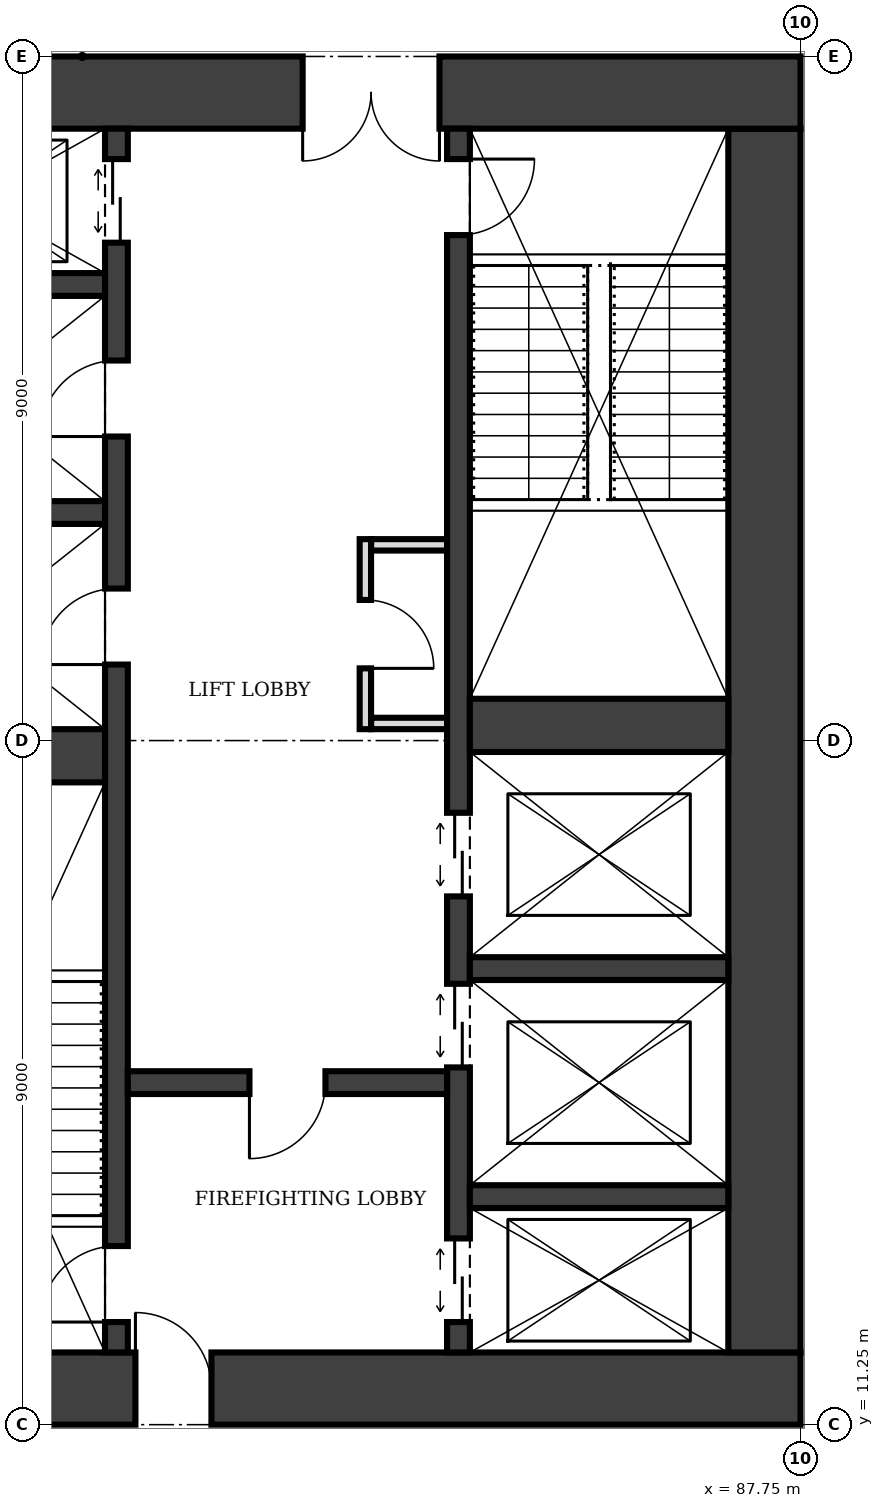
"""IFC4 building model, lengths in metres.
Left out: names, types, materials, properties, quantities, classifications, styles, units other than length and angle.
Written with IfcOpenShell. Run it as: python <this file> out.ifc"""

import sys

from ifc_helpers import new_model, si_unit, direction, frame, frame_2d, origin, place, context, subcontext, project, spatial, rectangle, extrude, element, fill, save


model = new_model("IFC4")
c1 = context("Model", 3, precision=1e-05, world=origin(), true_north=direction((0.0, 1.0)))
c2 = subcontext(c1, "Body", "Model", "MODEL_VIEW")
j1 = project(units=[si_unit("LENGTHUNIT", "METRE"), si_unit("PLANEANGLEUNIT", "RADIAN")], contexts=[c1])
p1 = place(None, origin())
s1 = spatial("IfcSite", under=j1, at=p1, CompositionType="ELEMENT")
p2 = place(p1, origin())
s2 = spatial("IfcBuilding", under=s1, at=p2, CompositionType="ELEMENT")
p3 = place(p2, frame((0.0, 0.0, 149.0)))
s3 = spatial("IfcBuildingStorey", under=s2, at=p3, CompositionType="ELEMENT", Elevation=149.0)
p4 = place(p3, frame((74.25, 11.725, 0.0), z_axis=(0.0, 0.0, 1.0), x_axis=(1.0, 0.0, 0.0)))
e1 = element("IfcWall", 1, at=p4, inside=s3, PredefinedType="SHEAR", context=c2, shape_type="SweptSolid", body=[
    extrude(rectangle(XDim=13.5, YDim=0.95, at=frame_2d((6.75, 0.0))), origin(), (0.0, 0.0, 1.0), 4.0),
])
p5 = place(p4, frame((4.75, 0.0, 0.0)))
e2 = element("IfcOpeningElement", 2, at=p5, cuts=e1, PredefinedType="OPENING", context=c2, shape_type="SweptSolid", body=[
    extrude(rectangle(XDim=1.0, YDim=2.1, at=frame_2d((0.5, 1.05))), frame((0.0, 0.485, 0.0), z_axis=(0.0, -1.0, 0.0), x_axis=(1.0, 0.0, 0.0)), (0.0, 0.0, 1.0), 0.97),
])
p6 = place(p3, frame((87.275, 12.2, 0.0), z_axis=(0.0, 0.0, 1.0), x_axis=(0.0, 1.0, 0.0)))
e3 = element("IfcWall", 3, at=p6, inside=s3, PredefinedType="SHEAR", context=c2, shape_type="SweptSolid", body=[
    extrude(rectangle(XDim=16.1, YDim=0.95, at=frame_2d((8.05, 0.0))), origin(), (0.0, 0.0, 1.0), 4.0),
])
p7 = place(p3, frame((87.75, 28.775, 0.0), z_axis=(0.0, 0.0, 1.0), x_axis=(-1.0, 0.0, 0.0)))
e4 = element("IfcWall", 4, at=p7, inside=s3, PredefinedType="SHEAR", context=c2, shape_type="SweptSolid", body=[
    extrude(rectangle(XDim=13.5, YDim=0.95, at=frame_2d((6.75, 0.0))), origin(), (0.0, 0.0, 1.0), 4.0),
])
p8 = place(p7, frame((4.75, 0.0, 0.0)))
e5 = element("IfcOpeningElement", 5, at=p8, cuts=e4, PredefinedType="OPENING", context=c2, shape_type="SweptSolid", body=[
    extrude(rectangle(XDim=1.8, YDim=2.1, at=frame_2d((0.9, 1.05))), frame((0.0, 0.485, 0.0), z_axis=(0.0, -1.0, 0.0), x_axis=(1.0, 0.0, 0.0)), (0.0, 0.0, 1.0), 0.97),
])
p9 = place(p3, frame((78.75, 12.2, 0.0), z_axis=(0.0, 0.0, 1.0), x_axis=(0.0, 1.0, 0.0)))
e6 = element("IfcWall", 6, at=p9, inside=s3, PredefinedType="SHEAR", context=c2, shape_type="SweptSolid", body=[
    extrude(rectangle(XDim=16.1, YDim=0.3, at=frame_2d((8.05, 0.0))), origin(), (0.0, 0.0, 1.0), 4.0),
])
p10 = place(p9, frame((0.4, 0.0, 0.0)))
e7 = element("IfcOpeningElement", 7, at=p10, cuts=e6, PredefinedType="OPENING", context=c2, shape_type="SweptSolid", body=[
    extrude(rectangle(XDim=1.0, YDim=2.1, at=frame_2d((0.5, 1.05))), frame((0.0, 0.16, 0.0), z_axis=(0.0, -1.0, 0.0), x_axis=(1.0, 0.0, 0.0)), (0.0, 0.0, 1.0), 0.32),
])
p11 = place(p9, frame((14.6, 0.0, 0.0)))
e8 = element("IfcOpeningElement", 8, at=p11, cuts=e6, PredefinedType="OPENING", context=c2, shape_type="SweptSolid", body=[
    extrude(rectangle(XDim=1.1, YDim=2.1, at=frame_2d((0.55, 1.05))), frame((0.0, 0.16, 0.0), z_axis=(0.0, -1.0, 0.0), x_axis=(1.0, 0.0, 0.0)), (0.0, 0.0, 1.0), 0.32),
])
p12 = place(p9, frame((9.05, 0.0, 0.0)))
e9 = element("IfcOpeningElement", 9, at=p12, cuts=e6, PredefinedType="OPENING", context=c2, shape_type="SweptSolid", body=[
    extrude(rectangle(XDim=1.0, YDim=2.1, at=frame_2d((0.5, 1.05))), frame((0.0, 0.16, 0.0), z_axis=(0.0, -1.0, 0.0), x_axis=(1.0, 0.0, 0.0)), (0.0, 0.0, 1.0), 0.32),
])
p13 = place(p9, frame((12.05, 0.0, 0.0)))
e10 = element("IfcOpeningElement", 10, at=p13, cuts=e6, PredefinedType="OPENING", context=c2, shape_type="SweptSolid", body=[
    extrude(rectangle(XDim=1.0, YDim=2.1, at=frame_2d((0.5, 1.05))), frame((0.0, 0.16, 0.0), z_axis=(0.0, -1.0, 0.0), x_axis=(1.0, 0.0, 0.0)), (0.0, 0.0, 1.0), 0.32),
])
p14 = place(p3, frame((83.25, 12.2, 0.0), z_axis=(0.0, 0.0, 1.0), x_axis=(0.0, 1.0, 0.0)))
e11 = element("IfcWall", 11, at=p14, inside=s3, PredefinedType="SHEAR", context=c2, shape_type="SweptSolid", body=[
    extrude(rectangle(XDim=16.1, YDim=0.3, at=frame_2d((8.05, 0.0))), origin(), (0.0, 0.0, 1.0), 4.0),
])
p15 = place(p14, frame((14.7, 0.0, 0.0)))
e12 = element("IfcOpeningElement", 12, at=p15, cuts=e11, PredefinedType="OPENING", context=c2, shape_type="SweptSolid", body=[
    extrude(rectangle(XDim=1.0, YDim=2.1, at=frame_2d((0.5, 1.05))), frame((0.0, 0.16, 0.0), z_axis=(0.0, -1.0, 0.0), x_axis=(1.0, 0.0, 0.0)), (0.0, 0.0, 1.0), 0.32),
])
p16 = place(p14, frame((0.4, 0.0, 0.0)))
e13 = element("IfcOpeningElement", 13, at=p16, cuts=e11, PredefinedType="OPENING", context=c2, shape_type="SweptSolid", body=[
    extrude(rectangle(XDim=1.1, YDim=2.1, at=frame_2d((0.55, 1.05))), frame((0.0, 0.16, 0.0), z_axis=(0.0, -1.0, 0.0), x_axis=(1.0, 0.0, 0.0)), (0.0, 0.0, 1.0), 0.32),
])
p17 = place(p14, frame((3.75, 0.0, 0.0)))
e14 = element("IfcOpeningElement", 14, at=p17, cuts=e11, PredefinedType="OPENING", context=c2, shape_type="SweptSolid", body=[
    extrude(rectangle(XDim=1.1, YDim=2.1, at=frame_2d((0.55, 1.05))), frame((0.0, 0.16, 0.0), z_axis=(0.0, -1.0, 0.0), x_axis=(1.0, 0.0, 0.0)), (0.0, 0.0, 1.0), 0.32),
])
p18 = place(p14, frame((6.0, 0.0, 0.0)))
e15 = element("IfcOpeningElement", 15, at=p18, cuts=e11, PredefinedType="OPENING", context=c2, shape_type="SweptSolid", body=[
    extrude(rectangle(XDim=1.1, YDim=2.1, at=frame_2d((0.55, 1.05))), frame((0.0, 0.16, 0.0), z_axis=(0.0, -1.0, 0.0), x_axis=(1.0, 0.0, 0.0)), (0.0, 0.0, 1.0), 0.32),
])
p19 = place(p3, frame((75.2, 20.05, 0.0), z_axis=(0.0, 0.0, 1.0), x_axis=(1.0, 0.0, 0.0)))
e16 = element("IfcWall", 16, at=p19, inside=s3, PredefinedType="SHEAR", context=c2, shape_type="SweptSolid", body=[
    extrude(rectangle(XDim=3.4, YDim=0.7, at=frame_2d((1.7, 0.0))), origin(), (0.0, 0.0, 1.0), 4.0),
])
p20 = place(p3, frame((78.9, 15.75, 0.0), z_axis=(0.0, 0.0, 1.0), x_axis=(1.0, 0.0, 0.0)))
e17 = element("IfcWall", 17, at=p20, inside=s3, PredefinedType="SHEAR", context=c2, shape_type="SweptSolid", body=[
    extrude(rectangle(XDim=4.2, YDim=0.3, at=frame_2d((2.1, 0.0))), origin(), (0.0, 0.0, 1.0), 4.0),
])
p21 = place(p20, frame((1.6, 0.0, 0.0)))
e18 = element("IfcOpeningElement", 18, at=p21, cuts=e17, PredefinedType="OPENING", context=c2, shape_type="SweptSolid", body=[
    extrude(rectangle(XDim=1.0, YDim=2.1, at=frame_2d((0.5, 1.05))), frame((0.0, 0.16, 0.0), z_axis=(0.0, -1.0, 0.0), x_axis=(1.0, 0.0, 0.0)), (0.0, 0.0, 1.0), 0.32),
])
for number, where, z_axis, x_axis in (
    (19, (83.4, 14.25, 0.0), (0.0, 0.0, 1.0), (1.0, 0.0, 0.0)),
    (20, (83.4, 17.25, 0.0), (0.0, 0.0, 1.0), (1.0, 0.0, 0.0)),
):
    element("IfcWall", number, at=place(p3, frame(where, z_axis=z_axis, x_axis=x_axis)), inside=s3, PredefinedType="SHEAR", context=c2, shape_type="SweptSolid", body=[
        extrude(rectangle(XDim=3.4, YDim=0.3, at=frame_2d((1.7, 0.0))), origin(), (0.0, 0.0, 1.0), 4.0),
    ])
p22 = place(p3, frame((83.4, 20.45, 0.0), z_axis=(0.0, 0.0, 1.0), x_axis=(1.0, 0.0, 0.0)))
e21 = element("IfcWall", 21, at=p22, inside=s3, PredefinedType="SHEAR", context=c2, shape_type="SweptSolid", body=[
    extrude(rectangle(XDim=3.4, YDim=0.7, at=frame_2d((1.7, 0.0))), origin(), (0.0, 0.0, 1.0), 4.0),
])
for number, where, z_axis, x_axis in (
    (22, (75.2, 23.25, 0.0), (0.0, 0.0, 1.0), (1.0, 0.0, 0.0)),
    (23, (75.2, 26.25, 0.0), (0.0, 0.0, 1.0), (1.0, 0.0, 0.0)),
):
    element("IfcWall", number, at=place(p3, frame(where, z_axis=z_axis, x_axis=x_axis)), inside=s3, PredefinedType="SHEAR", context=c2, shape_type="SweptSolid", body=[
        extrude(rectangle(XDim=3.4, YDim=0.3, at=frame_2d((1.7, 0.0))), origin(), (0.0, 0.0, 1.0), 4.0),
    ])
p23 = place(p3, frame((82.025, 20.4, 0.0), z_axis=(0.0, 0.0, 1.0), x_axis=(0.0, 1.0, 0.0)))
e24 = element("IfcWall", 24, at=p23, inside=s3, PredefinedType="PARTITIONING", context=c2, shape_type="SweptSolid", body=[
    extrude(rectangle(XDim=2.5, YDim=0.15, at=frame_2d((1.25, 0.0))), origin(), (0.0, 0.0, 1.0), 3.75),
])
p24 = place(p23, frame((0.8, 0.0, 0.0)))
e25 = element("IfcOpeningElement", 25, at=p24, cuts=e24, PredefinedType="OPENING", context=c2, shape_type="SweptSolid", body=[
    extrude(rectangle(XDim=0.9, YDim=2.1, at=frame_2d((0.45, 1.05))), frame((0.0, 0.085, 0.0), z_axis=(0.0, -1.0, 0.0), x_axis=(1.0, 0.0, 0.0)), (0.0, 0.0, 1.0), 0.17),
])
for number, where, z_axis, x_axis in (
    (26, (82.1, 20.475, 0.0), (0.0, 0.0, 1.0), (1.0, 0.0, 0.0)),
    (27, (82.1, 22.825, 0.0), (0.0, 0.0, 1.0), (1.0, 0.0, 0.0)),
):
    element("IfcWall", number, at=place(p3, frame(where, z_axis=z_axis, x_axis=x_axis)), inside=s3, PredefinedType="PARTITIONING", context=c2, shape_type="SweptSolid", body=[
        extrude(rectangle(XDim=1.0, YDim=0.15, at=frame_2d((0.5, 0.0))), origin(), (0.0, 0.0, 1.0), 3.75),
    ])
p25 = place(p5, origin())
e28 = element("IfcDoor", 28, at=p25, inside=s3, OperationType="SINGLE_SWING_LEFT", PredefinedType="DOOR", context=c2, shape_type="SweptSolid", body=[
    extrude(rectangle(XDim=1.0, YDim=2.1, at=frame_2d((0.5, 1.05))), frame((0.0, 0.025, 0.0), z_axis=(0.0, -1.0, 0.0), x_axis=(1.0, 0.0, 0.0)), (0.0, 0.0, 1.0), 0.05),
])
fill(e2, e28)
p26 = place(p8, origin())
e29 = element("IfcDoor", 29, at=p26, inside=s3, OperationType="DOUBLE_DOOR_SINGLE_SWING", PredefinedType="DOOR", context=c2, shape_type="SweptSolid", body=[
    extrude(rectangle(XDim=1.8, YDim=2.1, at=frame_2d((0.9, 1.05))), frame((0.0, 0.025, 0.0), z_axis=(0.0, -1.0, 0.0), x_axis=(1.0, 0.0, 0.0)), (0.0, 0.0, 1.0), 0.05),
])
fill(e5, e29)
p27 = place(p21, frame((1.0, 0.0, 0.0), z_axis=(0.0, 0.0, 1.0), x_axis=(-1.0, 0.0, 0.0)))
e30 = element("IfcDoor", 30, at=p27, inside=s3, OperationType="SINGLE_SWING_RIGHT", PredefinedType="DOOR", context=c2, shape_type="SweptSolid", body=[
    extrude(rectangle(XDim=1.0, YDim=2.1, at=frame_2d((0.5, 1.05))), frame((0.0, 0.025, 0.0), z_axis=(0.0, -1.0, 0.0), x_axis=(1.0, 0.0, 0.0)), (0.0, 0.0, 1.0), 0.05),
])
fill(e18, e30)
p28 = place(p10, origin())
e31 = element("IfcDoor", 31, at=p28, inside=s3, OperationType="SINGLE_SWING_LEFT", PredefinedType="DOOR", context=c2, shape_type="SweptSolid", body=[
    extrude(rectangle(XDim=1.0, YDim=2.1, at=frame_2d((0.5, 1.05))), frame((0.0, 0.025, 0.0), z_axis=(0.0, -1.0, 0.0), x_axis=(1.0, 0.0, 0.0)), (0.0, 0.0, 1.0), 0.05),
])
fill(e7, e31)
p29 = place(p15, frame((1.0, 0.0, 0.0), z_axis=(0.0, 0.0, 1.0), x_axis=(-1.0, 0.0, 0.0)))
e32 = element("IfcDoor", 32, at=p29, inside=s3, OperationType="SINGLE_SWING_LEFT", PredefinedType="DOOR", context=c2, shape_type="SweptSolid", body=[
    extrude(rectangle(XDim=1.0, YDim=2.1, at=frame_2d((0.5, 1.05))), frame((0.0, 0.025, 0.0), z_axis=(0.0, -1.0, 0.0), x_axis=(1.0, 0.0, 0.0)), (0.0, 0.0, 1.0), 0.05),
])
fill(e12, e32)
p30 = place(p16, origin())
e33 = element("IfcDoor", 33, at=p30, inside=s3, OperationType="DOUBLE_DOOR_SLIDING", PredefinedType="DOOR", context=c2, shape_type="SweptSolid", body=[
    extrude(rectangle(XDim=1.1, YDim=2.1, at=frame_2d((0.55, 1.05))), frame((0.0, 0.025, 0.0), z_axis=(0.0, -1.0, 0.0), x_axis=(1.0, 0.0, 0.0)), (0.0, 0.0, 1.0), 0.05),
])
fill(e13, e33)
p31 = place(p11, origin())
e34 = element("IfcDoor", 34, at=p31, inside=s3, OperationType="DOUBLE_DOOR_SLIDING", PredefinedType="DOOR", context=c2, shape_type="SweptSolid", body=[
    extrude(rectangle(XDim=1.1, YDim=2.1, at=frame_2d((0.55, 1.05))), frame((0.0, 0.025, 0.0), z_axis=(0.0, -1.0, 0.0), x_axis=(1.0, 0.0, 0.0)), (0.0, 0.0, 1.0), 0.05),
])
fill(e8, e34)
p32 = place(p17, origin())
e35 = element("IfcDoor", 35, at=p32, inside=s3, OperationType="DOUBLE_DOOR_SLIDING", PredefinedType="DOOR", context=c2, shape_type="SweptSolid", body=[
    extrude(rectangle(XDim=1.1, YDim=2.1, at=frame_2d((0.55, 1.05))), frame((0.0, 0.025, 0.0), z_axis=(0.0, -1.0, 0.0), x_axis=(1.0, 0.0, 0.0)), (0.0, 0.0, 1.0), 0.05),
])
fill(e14, e35)
p33 = place(p18, origin())
e36 = element("IfcDoor", 36, at=p33, inside=s3, OperationType="DOUBLE_DOOR_SLIDING", PredefinedType="DOOR", context=c2, shape_type="SweptSolid", body=[
    extrude(rectangle(XDim=1.1, YDim=2.1, at=frame_2d((0.55, 1.05))), frame((0.0, 0.025, 0.0), z_axis=(0.0, -1.0, 0.0), x_axis=(1.0, 0.0, 0.0)), (0.0, 0.0, 1.0), 0.05),
])
fill(e15, e36)
p34 = place(p24, frame((0.9, 0.0, 0.0), z_axis=(0.0, 0.0, 1.0), x_axis=(-1.0, 0.0, 0.0)))
e37 = element("IfcDoor", 37, at=p34, inside=s3, OperationType="SINGLE_SWING_RIGHT", PredefinedType="DOOR", context=c2, shape_type="SweptSolid", body=[
    extrude(rectangle(XDim=0.9, YDim=2.1, at=frame_2d((0.45, 1.05))), frame((0.0, 0.025, 0.0), z_axis=(0.0, -1.0, 0.0), x_axis=(1.0, 0.0, 0.0)), (0.0, 0.0, 1.0), 0.05),
])
fill(e25, e37)
p35 = place(p12, origin())
e38 = element("IfcDoor", 38, at=p35, inside=s3, OperationType="SINGLE_SWING_LEFT", PredefinedType="DOOR", context=c2, shape_type="SweptSolid", body=[
    extrude(rectangle(XDim=1.0, YDim=2.1, at=frame_2d((0.5, 1.05))), frame((0.0, 0.025, 0.0), z_axis=(0.0, -1.0, 0.0), x_axis=(1.0, 0.0, 0.0)), (0.0, 0.0, 1.0), 0.05),
])
fill(e9, e38)
p36 = place(p13, origin())
e39 = element("IfcDoor", 39, at=p36, inside=s3, OperationType="SINGLE_SWING_LEFT", PredefinedType="DOOR", context=c2, shape_type="SweptSolid", body=[
    extrude(rectangle(XDim=1.0, YDim=2.1, at=frame_2d((0.5, 1.05))), frame((0.0, 0.025, 0.0), z_axis=(0.0, -1.0, 0.0), x_axis=(1.0, 0.0, 0.0)), (0.0, 0.0, 1.0), 0.05),
])
fill(e10, e39)
save(model, sys.argv[1])
